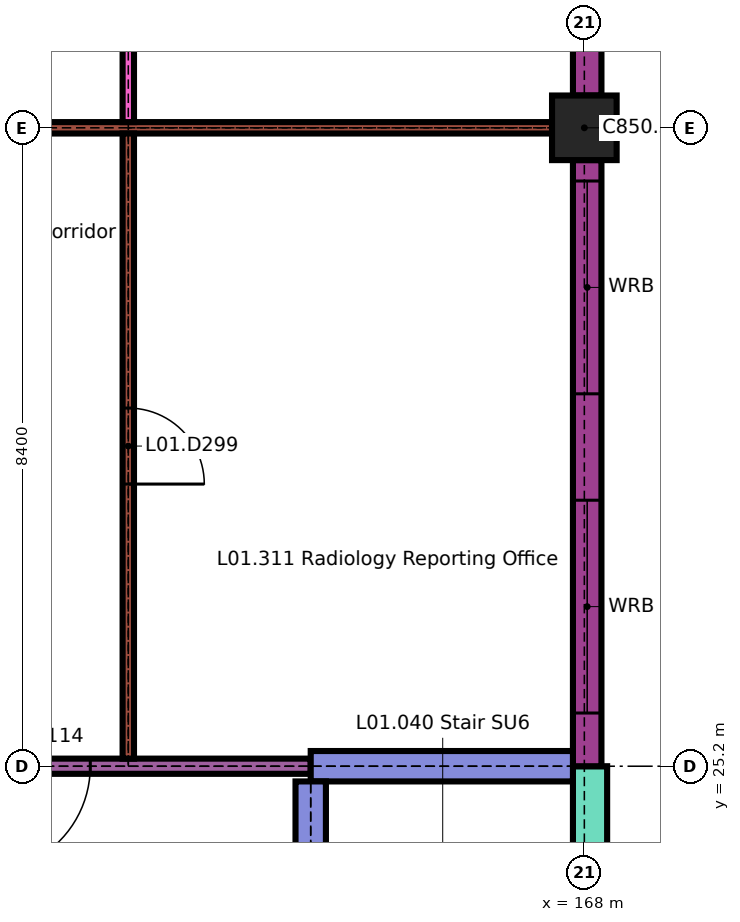
"""IFC4 building model, lengths in metres.
Left out: names, types, materials, properties, quantities, classifications, styles, units other than length and angle.
Written with IfcOpenShell. Run it as: python <this file> out.ifc"""

import sys

from ifc_helpers import new_model, si_unit, direction, frame, frame_2d, origin, origin_2d, place, context, subcontext, project, spatial, rectangle, extrude, element, fill, save


model = new_model("IFC4")
c1 = context("Model", 3, precision=1e-05, world=origin(), true_north=direction((0.0, 1.0)))
c2 = subcontext(c1, "Body", "Model", "MODEL_VIEW")
j1 = project(units=[si_unit("LENGTHUNIT", "METRE"), si_unit("PLANEANGLEUNIT", "RADIAN")], contexts=[c1])
p1 = place(None, origin())
s1 = spatial("IfcSite", under=j1, at=p1, CompositionType="ELEMENT")
p2 = place(p1, origin())
s2 = spatial("IfcBuilding", under=s1, at=p2, CompositionType="ELEMENT")
p3 = place(p2, frame((0.0, 0.0, 4.5)))
s3 = spatial("IfcBuildingStorey", under=s2, at=p3, CompositionType="ELEMENT", Elevation=4.5)
p4 = place(p3, frame((168.0, 33.6, 0.0), z_axis=(0.0, 0.0, 1.0), x_axis=(1.0, 0.0, 0.0)))
e1 = element("IfcColumn", 1, at=p4, inside=s3, PredefinedType="COLUMN", context=c2, shape_type="SweptSolid", body=[
    extrude(rectangle(XDim=0.85, YDim=0.85, at=origin_2d()), origin(), (0.0, 0.0, 1.0), 3.45),
])
p5 = place(p3, frame((168.075, 21.35, 0.0), z_axis=(0.0, 0.0, 1.0), x_axis=(0.0, 1.0, 0.0)))
e2 = element("IfcWall", 2, at=p5, inside=s3, PredefinedType="SOLIDWALL", context=c2, shape_type="SweptSolid", body=[
    extrude(rectangle(XDim=3.85, YDim=0.45, at=frame_2d((1.925, 0.0))), origin(), (0.0, 0.0, 1.0), 3.45),
])
p6 = place(p3, frame((168.038, 25.2, 0.0), z_axis=(0.0, 0.0, 1.0), x_axis=(0.0, 1.0, 0.0)))
e3 = element("IfcWall", 3, at=p6, inside=s3, PredefinedType="SOLIDWALL", context=c2, shape_type="SweptSolid", body=[
    extrude(rectangle(XDim=7.975, YDim=0.375, at=frame_2d((3.988, 0.0))), origin(), (0.0, 0.0, 1.0), 3.15),
])
p7 = place(p6, frame((0.7, 0.0, 1.0)))
e4 = element("IfcOpeningElement", 4, at=p7, cuts=e3, PredefinedType="OPENING", context=c2, shape_type="SweptSolid", body=[
    extrude(rectangle(XDim=2.8, YDim=1.2, at=frame_2d((1.4, 0.6))), frame((0.0, 0.198, 0.0), z_axis=(0.0, -1.0, 0.0), x_axis=(1.0, 0.0, 0.0)), (0.0, 0.0, 1.0), 0.395),
])
p8 = place(p6, frame((4.9, 0.0, 1.0)))
e5 = element("IfcOpeningElement", 5, at=p8, cuts=e3, PredefinedType="OPENING", context=c2, shape_type="SweptSolid", body=[
    extrude(rectangle(XDim=2.8, YDim=1.2, at=frame_2d((1.4, 0.6))), frame((0.0, 0.198, 0.0), z_axis=(0.0, -1.0, 0.0), x_axis=(1.0, 0.0, 0.0)), (0.0, 0.0, 1.0), 0.395),
])
p9 = place(p3, frame((168.038, 34.025, 0.0), z_axis=(0.0, 0.0, 1.0), x_axis=(0.0, 1.0, 0.0)))
e6 = element("IfcWall", 6, at=p9, inside=s3, PredefinedType="SOLIDWALL", context=c2, shape_type="SweptSolid", body=[
    extrude(rectangle(XDim=7.55, YDim=0.375, at=frame_2d((3.775, 0.0))), origin(), (0.0, 0.0, 1.0), 3.15),
])
p10 = place(p9, frame((0.775, 0.0, 0.9)))
e7 = element("IfcOpeningElement", 7, at=p10, cuts=e6, PredefinedType="OPENING", context=c2, shape_type="SweptSolid", body=[
    extrude(rectangle(XDim=1.8, YDim=1.5, at=frame_2d((0.9, 0.75))), frame((0.0, 0.198, 0.0), z_axis=(0.0, -1.0, 0.0), x_axis=(1.0, 0.0, 0.0)), (0.0, 0.0, 1.0), 0.395),
])
p11 = place(p9, frame((4.975, 0.0, 0.9)))
e8 = element("IfcOpeningElement", 8, at=p11, cuts=e6, PredefinedType="OPENING", context=c2, shape_type="SweptSolid", body=[
    extrude(rectangle(XDim=1.8, YDim=1.5, at=frame_2d((0.9, 0.75))), frame((0.0, 0.198, 0.0), z_axis=(0.0, -1.0, 0.0), x_axis=(1.0, 0.0, 0.0)), (0.0, 0.0, 1.0), 0.395),
])
p12 = place(p3, frame((159.5, 25.2, 0.0), z_axis=(0.0, 0.0, 1.0), x_axis=(1.0, 0.0, 0.0)))
e9 = element("IfcWall", 9, at=p12, inside=s3, PredefinedType="PARTITIONING", context=c2, shape_type="SweptSolid", body=[
    extrude(rectangle(XDim=4.9, YDim=0.2, at=frame_2d((2.45, 0.0))), origin(), (0.0, 0.0, 1.0), 3.45),
])
p13 = place(p12, frame((0.6, 0.0, 0.0)))
e10 = element("IfcOpeningElement", 10, at=p13, cuts=e9, PredefinedType="OPENING", context=c2, shape_type="SweptSolid", body=[
    extrude(rectangle(XDim=1.4, YDim=2.1, at=frame_2d((0.7, 1.05))), frame((0.0, 0.11, 0.0), z_axis=(0.0, -1.0, 0.0), x_axis=(1.0, 0.0, 0.0)), (0.0, 0.0, 1.0), 0.22),
])
p14 = place(p3, frame((164.4, 25.2, 0.0), z_axis=(0.0, 0.0, 1.0), x_axis=(1.0, 0.0, 0.0)))
e11 = element("IfcWall", 11, at=p14, inside=s3, PredefinedType="SHEAR", context=c2, shape_type="SweptSolid", body=[
    extrude(rectangle(XDim=3.45, YDim=0.4, at=frame_2d((1.725, 0.0))), origin(), (0.0, 0.0, 1.0), 3.45),
])
p15 = place(p3, frame((160.025, 33.6, 0.0), z_axis=(0.0, 0.0, 1.0), x_axis=(1.0, 0.0, 0.0)))
e12 = element("IfcWall", 12, at=p15, inside=s3, PredefinedType="PARTITIONING", context=c2, shape_type="SweptSolid", body=[
    extrude(rectangle(XDim=7.55, YDim=0.15, at=frame_2d((3.775, 0.0))), origin(), (0.0, 0.0, 1.0), 3.45),
])
p16 = place(p3, frame((162.0, 25.3, 0.0), z_axis=(0.0, 0.0, 1.0), x_axis=(0.0, 1.0, 0.0)))
e13 = element("IfcWall", 13, at=p16, inside=s3, PredefinedType="PARTITIONING", context=c2, shape_type="SweptSolid", body=[
    extrude(rectangle(XDim=8.225, YDim=0.15, at=frame_2d((4.112, 0.0))), origin(), (0.0, 0.0, 1.0), 3.45),
])
p17 = place(p16, frame((3.613, 0.0, 0.0)))
e14 = element("IfcOpeningElement", 14, at=p17, cuts=e13, PredefinedType="OPENING", context=c2, shape_type="SweptSolid", body=[
    extrude(rectangle(XDim=1.0, YDim=2.1, at=frame_2d((0.5, 1.05))), frame((0.0, 0.085, 0.0), z_axis=(0.0, -1.0, 0.0), x_axis=(1.0, 0.0, 0.0)), (0.0, 0.0, 1.0), 0.17),
])
p18 = place(p3, frame((162.0, 33.675, 0.0), z_axis=(0.0, 0.0, 1.0), x_axis=(0.0, 1.0, 0.0)))
e15 = element("IfcWall", 15, at=p18, inside=s3, PredefinedType="PARTITIONING", context=c2, shape_type="SweptSolid", body=[
    extrude(rectangle(XDim=16.625, YDim=0.15, at=frame_2d((8.312, 0.0))), origin(), (0.0, 0.0, 1.0), 3.6),
])
p19 = place(p18, frame((3.462, 0.0, 0.0)))
e16 = element("IfcOpeningElement", 16, at=p19, cuts=e15, PredefinedType="OPENING", context=c2, shape_type="SweptSolid", body=[
    extrude(rectangle(XDim=1.4, YDim=2.1, at=frame_2d((0.7, 1.05))), frame((0.0, 0.085, 0.0), z_axis=(0.0, -1.0, 0.0), x_axis=(1.0, 0.0, 0.0)), (0.0, 0.0, 1.0), 0.17),
])
p20 = place(p18, frame((11.775, 0.0, 0.0)))
e17 = element("IfcOpeningElement", 17, at=p20, cuts=e15, PredefinedType="OPENING", context=c2, shape_type="SweptSolid", body=[
    extrude(rectangle(XDim=1.4, YDim=2.1, at=frame_2d((0.7, 1.05))), frame((0.0, 0.085, 0.0), z_axis=(0.0, -1.0, 0.0), x_axis=(1.0, 0.0, 0.0)), (0.0, 0.0, 1.0), 0.17),
])
p21 = place(p3, frame((164.4, 17.0, 0.0), z_axis=(0.0, 0.0, 1.0), x_axis=(0.0, 1.0, 0.0)))
e18 = element("IfcWall", 18, at=p21, inside=s3, PredefinedType="SHEAR", context=c2, shape_type="SweptSolid", body=[
    extrude(rectangle(XDim=8.0, YDim=0.4, at=frame_2d((4.0, 0.0))), origin(), (0.0, 0.0, 1.0), 3.45),
])
p22 = place(p21, frame((0.4, 0.0, 0.0)))
e19 = element("IfcOpeningElement", 19, at=p22, cuts=e18, PredefinedType="OPENING", context=c2, shape_type="SweptSolid", body=[
    extrude(rectangle(XDim=1.2, YDim=2.1, at=frame_2d((0.6, 1.05))), frame((0.0, 0.21, 0.0), z_axis=(0.0, -1.0, 0.0), x_axis=(1.0, 0.0, 0.0)), (0.0, 0.0, 1.0), 0.42),
])
p23 = place(p7, origin())
e20 = element("IfcWindow", 20, at=p23, inside=s3, PartitioningType="DOUBLE_PANEL_VERTICAL", PredefinedType="WINDOW", context=c2, shape_type="SweptSolid", body=[
    extrude(rectangle(XDim=2.8, YDim=1.2, at=frame_2d((1.4, 0.6))), frame((0.0, 0.03, 0.0), z_axis=(0.0, -1.0, 0.0), x_axis=(1.0, 0.0, 0.0)), (0.0, 0.0, 1.0), 0.06),
])
fill(e4, e20)
p24 = place(p8, origin())
e21 = element("IfcWindow", 21, at=p24, inside=s3, PartitioningType="DOUBLE_PANEL_VERTICAL", PredefinedType="WINDOW", context=c2, shape_type="SweptSolid", body=[
    extrude(rectangle(XDim=2.8, YDim=1.2, at=frame_2d((1.4, 0.6))), frame((0.0, 0.03, 0.0), z_axis=(0.0, -1.0, 0.0), x_axis=(1.0, 0.0, 0.0)), (0.0, 0.0, 1.0), 0.06),
])
fill(e5, e21)
p25 = place(p13, origin())
e22 = element("IfcDoor", 22, at=p25, inside=s3, OperationType="SINGLE_SWING_LEFT", PredefinedType="DOOR", context=c2, shape_type="SweptSolid", body=[
    extrude(rectangle(XDim=1.4, YDim=2.1, at=frame_2d((0.7, 1.05))), frame((0.0, 0.03, 0.0), z_axis=(0.0, -1.0, 0.0), x_axis=(1.0, 0.0, 0.0)), (0.0, 0.0, 1.0), 0.06),
])
fill(e10, e22)
p26 = place(p17, origin())
e23 = element("IfcDoor", 23, at=p26, inside=s3, OperationType="SINGLE_SWING_LEFT", PredefinedType="DOOR", context=c2, shape_type="SweptSolid", body=[
    extrude(rectangle(XDim=1.0, YDim=2.1, at=frame_2d((0.5, 1.05))), frame((0.0, 0.025, 0.0), z_axis=(0.0, -1.0, 0.0), x_axis=(1.0, 0.0, 0.0)), (0.0, 0.0, 1.0), 0.05),
])
fill(e14, e23)
save(model, sys.argv[1])
